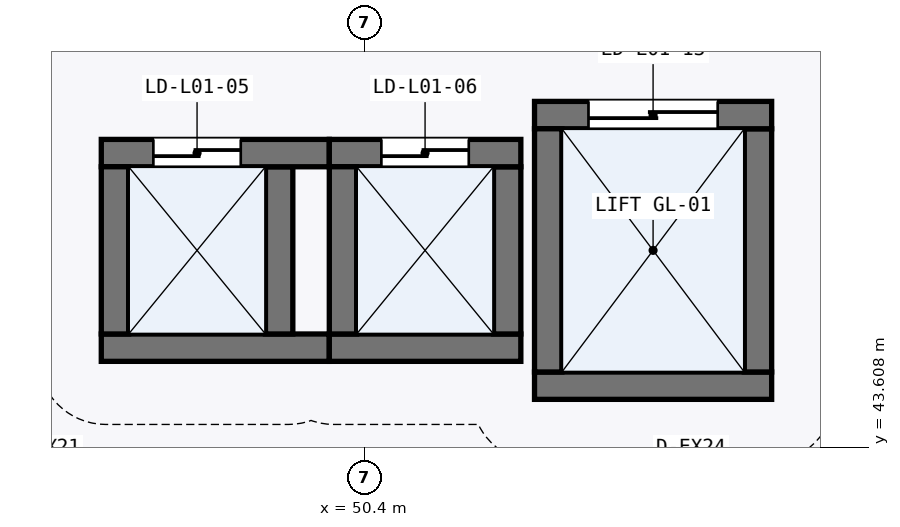
"""IFC4 building model, lengths in metres.
Left out: names, types, materials, properties, quantities, classifications, styles, units other than length and angle.
Written with IfcOpenShell. Run it as: python <this file> out.ifc"""

import sys

from ifc_helpers import new_model, si_unit, direction, frame, frame_2d, origin, place, context, subcontext, project, spatial, rectangle, extrude, element, fill, save


model = new_model("IFC4")
c1 = context("Model", 3, precision=1e-05, world=origin(), true_north=direction((0.0, 1.0)))
c2 = subcontext(c1, "Body", "Model", "MODEL_VIEW")
j1 = project(units=[si_unit("LENGTHUNIT", "METRE"), si_unit("PLANEANGLEUNIT", "RADIAN")], contexts=[c1])
p1 = place(None, origin())
s1 = spatial("IfcSite", under=j1, at=p1, CompositionType="ELEMENT")
p2 = place(p1, origin())
s2 = spatial("IfcBuilding", under=s1, at=p2, CompositionType="ELEMENT")
p3 = place(p2, origin())
s3 = spatial("IfcBuildingStorey", under=s2, at=p3, CompositionType="ELEMENT", Elevation=0.0)
p4 = place(p3, frame((46.94, 44.92, 0.0), z_axis=(0.0, 0.0, 1.0), x_axis=(1.0, 0.0, 0.0)))
e1 = element("IfcWall", 1, at=p4, inside=s3, PredefinedType="SHEAR", context=c2, shape_type="SweptSolid", body=[
    extrude(rectangle(XDim=3.0, YDim=0.36, at=frame_2d((1.5, 0.0))), origin(), (0.0, 0.0, 1.0), 5.745),
])
p5 = place(p3, frame((49.28, 45.1, 0.0), z_axis=(0.0, 0.0, 1.0), x_axis=(0.0, 1.0, 0.0)))
e2 = element("IfcWall", 2, at=p5, inside=s3, PredefinedType="SHEAR", context=c2, shape_type="SweptSolid", body=[
    extrude(rectangle(XDim=2.2, YDim=0.36, at=frame_2d((1.1, 0.0))), origin(), (0.0, 0.0, 1.0), 5.745),
])
p6 = place(p3, frame((49.94, 47.48, 0.0), z_axis=(0.0, 0.0, 1.0), x_axis=(-1.0, 0.0, 0.0)))
e3 = element("IfcWall", 3, at=p6, inside=s3, PredefinedType="SHEAR", context=c2, shape_type="SweptSolid", body=[
    extrude(rectangle(XDim=3.0, YDim=0.36, at=frame_2d((1.5, 0.0))), origin(), (0.0, 0.0, 1.0), 5.745),
])
p7 = place(p6, frame((1.165, 0.0, 0.0)))
e4 = element("IfcOpeningElement", 4, at=p7, cuts=e3, PredefinedType="OPENING", context=c2, shape_type="SweptSolid", body=[
    extrude(rectangle(XDim=1.15, YDim=2.2, at=frame_2d((0.575, 1.1))), frame((0.0, 0.19, 0.0), z_axis=(0.0, -1.0, 0.0), x_axis=(1.0, 0.0, 0.0)), (0.0, 0.0, 1.0), 0.38),
])
p8 = place(p3, frame((47.12, 47.3, 0.0), z_axis=(0.0, 0.0, 1.0), x_axis=(0.0, -1.0, 0.0)))
e5 = element("IfcWall", 5, at=p8, inside=s3, PredefinedType="SHEAR", context=c2, shape_type="SweptSolid", body=[
    extrude(rectangle(XDim=2.2, YDim=0.36, at=frame_2d((1.1, 0.0))), origin(), (0.0, 0.0, 1.0), 5.745),
])
p9 = place(p3, frame((49.94, 44.92, 0.0), z_axis=(0.0, 0.0, 1.0), x_axis=(1.0, 0.0, 0.0)))
e6 = element("IfcWall", 6, at=p9, inside=s3, PredefinedType="SHEAR", context=c2, shape_type="SweptSolid", body=[
    extrude(rectangle(XDim=2.52, YDim=0.36, at=frame_2d((1.26, 0.0))), origin(), (0.0, 0.0, 1.0), 5.745),
])
p10 = place(p3, frame((52.28, 45.1, 0.0), z_axis=(0.0, 0.0, 1.0), x_axis=(0.0, 1.0, 0.0)))
e7 = element("IfcWall", 7, at=p10, inside=s3, PredefinedType="SHEAR", context=c2, shape_type="SweptSolid", body=[
    extrude(rectangle(XDim=2.2, YDim=0.36, at=frame_2d((1.1, 0.0))), origin(), (0.0, 0.0, 1.0), 5.745),
])
p11 = place(p3, frame((52.46, 47.48, 0.0), z_axis=(0.0, 0.0, 1.0), x_axis=(-1.0, 0.0, 0.0)))
e8 = element("IfcWall", 8, at=p11, inside=s3, PredefinedType="SHEAR", context=c2, shape_type="SweptSolid", body=[
    extrude(rectangle(XDim=2.52, YDim=0.36, at=frame_2d((1.26, 0.0))), origin(), (0.0, 0.0, 1.0), 5.745),
])
p12 = place(p11, frame((0.685, 0.0, 0.0)))
e9 = element("IfcOpeningElement", 9, at=p12, cuts=e8, PredefinedType="OPENING", context=c2, shape_type="SweptSolid", body=[
    extrude(rectangle(XDim=1.15, YDim=2.2, at=frame_2d((0.575, 1.1))), frame((0.0, 0.19, 0.0), z_axis=(0.0, -1.0, 0.0), x_axis=(1.0, 0.0, 0.0)), (0.0, 0.0, 1.0), 0.38),
])
p13 = place(p3, frame((50.12, 47.3, 0.0), z_axis=(0.0, 0.0, 1.0), x_axis=(0.0, -1.0, 0.0)))
e10 = element("IfcWall", 10, at=p13, inside=s3, PredefinedType="SHEAR", context=c2, shape_type="SweptSolid", body=[
    extrude(rectangle(XDim=2.2, YDim=0.36, at=frame_2d((1.1, 0.0))), origin(), (0.0, 0.0, 1.0), 5.745),
])
p14 = place(p3, frame((52.64, 44.42, 0.0), z_axis=(0.0, 0.0, 1.0), x_axis=(1.0, 0.0, 0.0)))
e11 = element("IfcWall", 11, at=p14, inside=s3, PredefinedType="SHEAR", context=c2, shape_type="SweptSolid", body=[
    extrude(rectangle(XDim=3.12, YDim=0.36, at=frame_2d((1.56, 0.0))), origin(), (0.0, 0.0, 1.0), 5.745),
])
p15 = place(p3, frame((55.58, 44.6, 0.0), z_axis=(0.0, 0.0, 1.0), x_axis=(0.0, 1.0, 0.0)))
e12 = element("IfcWall", 12, at=p15, inside=s3, PredefinedType="SHEAR", context=c2, shape_type="SweptSolid", body=[
    extrude(rectangle(XDim=3.2, YDim=0.36, at=frame_2d((1.6, 0.0))), origin(), (0.0, 0.0, 1.0), 5.745),
])
p16 = place(p3, frame((55.76, 47.98, 0.0), z_axis=(0.0, 0.0, 1.0), x_axis=(-1.0, 0.0, 0.0)))
e13 = element("IfcWall", 13, at=p16, inside=s3, PredefinedType="SHEAR", context=c2, shape_type="SweptSolid", body=[
    extrude(rectangle(XDim=3.12, YDim=0.36, at=frame_2d((1.56, 0.0))), origin(), (0.0, 0.0, 1.0), 5.745),
])
p17 = place(p16, frame((0.71, 0.0, 0.0)))
e14 = element("IfcOpeningElement", 14, at=p17, cuts=e13, PredefinedType="OPENING", context=c2, shape_type="SweptSolid", body=[
    extrude(rectangle(XDim=1.7, YDim=2.3, at=frame_2d((0.85, 1.15))), frame((0.0, 0.19, 0.0), z_axis=(0.0, -1.0, 0.0), x_axis=(1.0, 0.0, 0.0)), (0.0, 0.0, 1.0), 0.38),
])
p18 = place(p3, frame((52.82, 47.8, 0.0), z_axis=(0.0, 0.0, 1.0), x_axis=(0.0, -1.0, 0.0)))
e15 = element("IfcWall", 15, at=p18, inside=s3, PredefinedType="SHEAR", context=c2, shape_type="SweptSolid", body=[
    extrude(rectangle(XDim=3.2, YDim=0.36, at=frame_2d((1.6, 0.0))), origin(), (0.0, 0.0, 1.0), 5.745),
])
p19 = place(p7, frame((1.15, 0.0, 0.0), z_axis=(0.0, 0.0, 1.0), x_axis=(-1.0, 0.0, 0.0)))
e16 = element("IfcDoor", 16, at=p19, inside=s3, OperationType="DOUBLE_DOOR_SLIDING", PredefinedType="DOOR", context=c2, shape_type="SweptSolid", body=[
    extrude(rectangle(XDim=1.15, YDim=2.2, at=frame_2d((0.575, 1.1))), frame((0.0, 0.025, 0.0), z_axis=(0.0, -1.0, 0.0), x_axis=(1.0, 0.0, 0.0)), (0.0, 0.0, 1.0), 0.05),
])
fill(e4, e16)
p20 = place(p12, frame((1.15, 0.0, 0.0), z_axis=(0.0, 0.0, 1.0), x_axis=(-1.0, 0.0, 0.0)))
e17 = element("IfcDoor", 17, at=p20, inside=s3, OperationType="DOUBLE_DOOR_SLIDING", PredefinedType="DOOR", context=c2, shape_type="SweptSolid", body=[
    extrude(rectangle(XDim=1.15, YDim=2.2, at=frame_2d((0.575, 1.1))), frame((0.0, 0.025, 0.0), z_axis=(0.0, -1.0, 0.0), x_axis=(1.0, 0.0, 0.0)), (0.0, 0.0, 1.0), 0.05),
])
fill(e9, e17)
p21 = place(p17, frame((1.7, 0.0, 0.0), z_axis=(0.0, 0.0, 1.0), x_axis=(-1.0, 0.0, 0.0)))
e18 = element("IfcDoor", 18, at=p21, inside=s3, OperationType="DOUBLE_DOOR_SLIDING", PredefinedType="DOOR", context=c2, shape_type="SweptSolid", body=[
    extrude(rectangle(XDim=1.7, YDim=2.3, at=frame_2d((0.85, 1.15))), frame((0.0, 0.025, 0.0), z_axis=(0.0, -1.0, 0.0), x_axis=(1.0, 0.0, 0.0)), (0.0, 0.0, 1.0), 0.05),
])
fill(e14, e18)
save(model, sys.argv[1])
